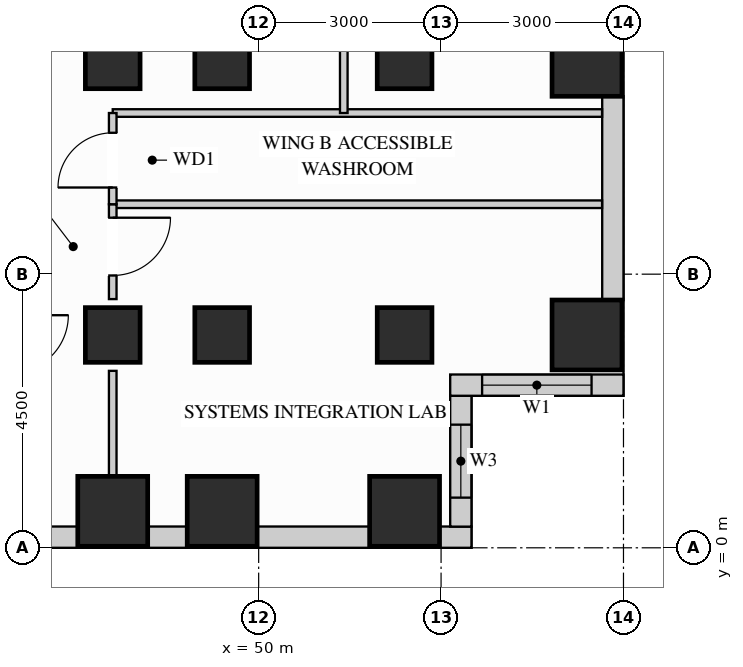
"""IFC4 building model, lengths in metres.
Left out: names, types, materials, properties, quantities, classifications, styles, units other than length and angle.
Written with IfcOpenShell. Run it as: python <this file> out.ifc"""

import sys

from ifc_helpers import new_model, si_unit, direction, frame, frame_2d, origin, origin_2d, place, context, subcontext, project, spatial, rectangle, extrude, source, transform, mapped, element, fill, save


model = new_model("IFC4")
c1 = context("Model", 3, precision=1e-05, world=origin(), true_north=direction((0.0, 1.0)))
c2 = subcontext(c1, "Body", "Model", "MODEL_VIEW")
j1 = project(units=[si_unit("LENGTHUNIT", "METRE"), si_unit("PLANEANGLEUNIT", "RADIAN")], contexts=[c1])
p1 = place(None, origin())
s1 = spatial("IfcSite", under=j1, at=p1, CompositionType="ELEMENT")
p2 = place(p1, origin())
s2 = spatial("IfcBuilding", under=s1, at=p2, CompositionType="ELEMENT")
p3 = place(p2, frame((0.0, 0.0, 77.4)))
s3 = spatial("IfcBuildingStorey", under=s2, at=p3, CompositionType="ELEMENT", Elevation=77.4)
m1 = source(origin(), c2, "Body", "SweptSolid", [
    extrude(rectangle(XDim=0.9, YDim=0.9, at=origin_2d()), origin(), (0.0, 0.0, 1.0), 3.38),
])
for number, where, z_axis, x_axis in (
    (1, (47.6, 3.5, 0.0), (0.0, 0.0, 1.0), (1.0, 0.0, 0.0)),
    (2, (47.6, 8.0, 0.0), (0.0, 0.0, 1.0), (1.0, 0.0, 0.0)),
    (3, (49.4, 3.5, 0.0), (0.0, 0.0, 1.0), (1.0, 0.0, 0.0)),
    (4, (49.4, 8.0, 0.0), (0.0, 0.0, 1.0), (1.0, 0.0, 0.0)),
    (5, (52.4, 3.5, 0.0), (0.0, 0.0, 1.0), (1.0, 0.0, 0.0)),
    (6, (52.4, 8.0, 0.0), (0.0, 0.0, 1.0), (1.0, 0.0, 0.0)),
):
    element("IfcColumn", number, at=place(p3, frame(where, z_axis=z_axis, x_axis=x_axis)), inside=s3, PredefinedType="COLUMN", context=c2, shape_type="MappedRepresentation", body=[
        mapped(m1, transform((0.0, 0.0, 0.0), x_axis=(1.0, 0.0, 0.0), y_axis=(0.0, 1.0, 0.0), z_axis=(0.0, 0.0, 1.0))),
    ])
m2 = source(origin(), c2, "Body", "SweptSolid", [
    extrude(rectangle(XDim=1.15, YDim=1.15, at=origin_2d()), origin(), (0.0, 0.0, 1.0), 3.38),
])
for number, where, z_axis, x_axis in (
    (7, (55.4, 3.5, 0.0), (0.0, 0.0, 1.0), (1.0, 0.0, 0.0)),
    (8, (55.4, 8.0, 0.0), (0.0, 0.0, 1.0), (1.0, 0.0, 0.0)),
    (9, (47.6, 0.6, 0.0), (0.0, 0.0, 1.0), (1.0, 0.0, 0.0)),
    (10, (49.4, 0.6, 0.0), (0.0, 0.0, 1.0), (1.0, 0.0, 0.0)),
    (11, (52.4, 0.6, 0.0), (0.0, 0.0, 1.0), (1.0, 0.0, 0.0)),
):
    element("IfcColumn", number, at=place(p3, frame(where, z_axis=z_axis, x_axis=x_axis)), inside=s3, PredefinedType="COLUMN", context=c2, shape_type="MappedRepresentation", body=[
        mapped(m2, transform((0.0, 0.0, 0.0), x_axis=(1.0, 0.0, 0.0), y_axis=(0.0, 1.0, 0.0), z_axis=(0.0, 0.0, 1.0))),
    ])
p4 = place(p3, frame((40.573, 0.175, 0.0), z_axis=(0.0, 0.0, 1.0), x_axis=(1.0, 0.0, 0.0)))
e12 = element("IfcWall", 12, at=p4, inside=s3, PredefinedType="SOLIDWALL", context=c2, shape_type="SweptSolid", body=[
    extrude(rectangle(XDim=6.454, YDim=0.35, at=frame_2d((3.227, 0.0))), origin(), (0.0, 0.0, 1.0), 3.365),
])
p5 = place(p4, frame((0.712, 0.0, 0.78)))
e13 = element("IfcOpeningElement", 13, at=p5, cuts=e12, PredefinedType="OPENING", context=c2, shape_type="SweptSolid", body=[
    extrude(rectangle(XDim=1.8, YDim=2.1, at=frame_2d((0.9, 1.05))), frame((0.0, 0.185, 0.0), z_axis=(0.0, -1.0, 0.0), x_axis=(1.0, 0.0, 0.0)), (0.0, 0.0, 1.0), 0.37),
])
p6 = place(p4, frame((2.905, 0.0, 0.78)))
e14 = element("IfcOpeningElement", 14, at=p6, cuts=e12, PredefinedType="OPENING", context=c2, shape_type="SweptSolid", body=[
    extrude(rectangle(XDim=1.8, YDim=2.1, at=frame_2d((0.9, 1.05))), frame((0.0, 0.185, 0.0), z_axis=(0.0, -1.0, 0.0), x_axis=(1.0, 0.0, 0.0)), (0.0, 0.0, 1.0), 0.37),
])
m3 = source(origin(), c2, "Body", "SweptSolid", [
    extrude(rectangle(XDim=0.654, YDim=0.35, at=frame_2d((0.327, 0.0))), origin(), (0.0, 0.0, 1.0), 3.365),
])
p7 = place(p3, frame((48.173, 0.175, 0.0), z_axis=(0.0, 0.0, 1.0), x_axis=(1.0, 0.0, 0.0)))
e15 = element("IfcWall", 15, at=p7, inside=s3, PredefinedType="SOLIDWALL", context=c2, shape_type="MappedRepresentation", body=[
    mapped(m3, transform((0.0, 0.0, 0.0), x_axis=(1.0, 0.0, 0.0), y_axis=(0.0, 1.0, 0.0), z_axis=(0.0, 0.0, 1.0))),
])
m4 = source(origin(), c2, "Body", "SweptSolid", [
    extrude(rectangle(XDim=1.854, YDim=0.35, at=frame_2d((0.927, 0.0))), origin(), (0.0, 0.0, 1.0), 3.365),
])
p8 = place(p3, frame((49.973, 0.175, 0.0), z_axis=(0.0, 0.0, 1.0), x_axis=(1.0, 0.0, 0.0)))
e16 = element("IfcWall", 16, at=p8, inside=s3, PredefinedType="SOLIDWALL", context=c2, shape_type="MappedRepresentation", body=[
    mapped(m4, transform((0.0, 0.0, 0.0), x_axis=(1.0, 0.0, 0.0), y_axis=(0.0, 1.0, 0.0), z_axis=(0.0, 0.0, 1.0))),
])
m5 = source(origin(), c2, "Body", "SweptSolid", [
    extrude(rectangle(XDim=0.527, YDim=0.35, at=frame_2d((0.264, 0.0))), origin(), (0.0, 0.0, 1.0), 3.365),
])
p9 = place(p3, frame((52.973, 0.175, 0.0), z_axis=(0.0, 0.0, 1.0), x_axis=(1.0, 0.0, 0.0)))
e17 = element("IfcWall", 17, at=p9, inside=s3, PredefinedType="SOLIDWALL", context=c2, shape_type="MappedRepresentation", body=[
    mapped(m5, transform((0.0, 0.0, 0.0), x_axis=(1.0, 0.0, 0.0), y_axis=(0.0, 1.0, 0.0), z_axis=(0.0, 0.0, 1.0))),
])
p10 = place(p3, frame((53.325, 0.348, 0.0), z_axis=(0.0, 0.0, 1.0), x_axis=(0.0, 1.0, 0.0)))
e18 = element("IfcWall", 18, at=p10, inside=s3, PredefinedType="SOLIDWALL", context=c2, shape_type="SweptSolid", body=[
    extrude(rectangle(XDim=2.154, YDim=0.35, at=frame_2d((1.077, 0.0))), origin(), (0.0, 0.0, 1.0), 3.365),
])
p11 = place(p10, frame((0.477, 0.0, 0.78)))
e19 = element("IfcOpeningElement", 19, at=p11, cuts=e18, PredefinedType="OPENING", context=c2, shape_type="SweptSolid", body=[
    extrude(rectangle(XDim=1.2, YDim=2.1, at=frame_2d((0.6, 1.05))), frame((0.0, 0.185, 0.0), z_axis=(0.0, -1.0, 0.0), x_axis=(1.0, 0.0, 0.0)), (0.0, 0.0, 1.0), 0.37),
])
p12 = place(p3, frame((53.15, 2.675, 0.0), z_axis=(0.0, 0.0, 1.0), x_axis=(1.0, 0.0, 0.0)))
e20 = element("IfcWall", 20, at=p12, inside=s3, PredefinedType="SOLIDWALL", context=c2, shape_type="SweptSolid", body=[
    extrude(rectangle(XDim=2.85, YDim=0.35, at=frame_2d((1.425, 0.0))), origin(), (0.0, 0.0, 1.0), 3.365),
])
p13 = place(p12, frame((0.525, 0.0, 0.78)))
e21 = element("IfcOpeningElement", 21, at=p13, cuts=e20, PredefinedType="OPENING", context=c2, shape_type="SweptSolid", body=[
    extrude(rectangle(XDim=1.8, YDim=2.1, at=frame_2d((0.9, 1.05))), frame((0.0, 0.185, 0.0), z_axis=(0.0, -1.0, 0.0), x_axis=(1.0, 0.0, 0.0)), (0.0, 0.0, 1.0), 0.37),
])
m6 = source(origin(), c2, "Body", "SweptSolid", [
    extrude(rectangle(XDim=3.354, YDim=0.35, at=frame_2d((1.677, 0.0))), origin(), (0.0, 0.0, 1.0), 3.365),
])
p14 = place(p3, frame((55.825, 4.073, 0.0), z_axis=(0.0, 0.0, 1.0), x_axis=(0.0, 1.0, 0.0)))
e22 = element("IfcWall", 22, at=p14, inside=s3, PredefinedType="SOLIDWALL", context=c2, shape_type="MappedRepresentation", body=[
    mapped(m6, transform((0.0, 0.0, 0.0), x_axis=(1.0, 0.0, 0.0), y_axis=(0.0, 1.0, 0.0), z_axis=(0.0, 0.0, 1.0))),
])
m7 = source(origin(), c2, "Body", "SweptSolid", [
    extrude(rectangle(XDim=8.048, YDim=0.125, at=frame_2d((4.024, 0.0))), origin(), (0.0, 0.0, 1.0), 3.365),
])
for number, where, z_axis, x_axis in (
    (23, (47.6, 5.65, 0.0), (0.0, 0.0, 1.0), (1.0, 0.0, 0.0)),
    (24, (47.6, 7.15, 0.0), (0.0, 0.0, 1.0), (1.0, 0.0, 0.0)),
):
    element("IfcWall", number, at=place(p3, frame(where, z_axis=z_axis, x_axis=x_axis)), inside=s3, PredefinedType="PARTITIONING", context=c2, shape_type="MappedRepresentation", body=[
        mapped(m7, transform((0.0, 0.0, 0.0), x_axis=(1.0, 0.0, 0.0), y_axis=(0.0, 1.0, 0.0), z_axis=(0.0, 0.0, 1.0))),
    ])
m8 = source(origin(), c2, "Body", "SweptSolid", [
    extrude(rectangle(XDim=3.45, YDim=0.125, at=frame_2d((1.725, 0.0))), origin(), (0.0, 0.0, 1.0), 3.365),
])
p15 = place(p3, frame((51.4, 7.15, 0.0), z_axis=(0.0, 0.0, 1.0), x_axis=(0.0, 1.0, 0.0)))
e25 = element("IfcWall", 25, at=p15, inside=s3, PredefinedType="PARTITIONING", context=c2, shape_type="MappedRepresentation", body=[
    mapped(m8, transform((0.0, 0.0, 0.0), x_axis=(1.0, 0.0, 0.0), y_axis=(0.0, 1.0, 0.0), z_axis=(0.0, 0.0, 1.0))),
])
p16 = place(p3, frame((47.6, 4.09, 0.0), z_axis=(0.0, 0.0, 1.0), x_axis=(0.0, 1.0, 0.0)))
e26 = element("IfcWall", 26, at=p16, inside=s3, PredefinedType="PARTITIONING", context=c2, shape_type="SweptSolid", body=[
    extrude(rectangle(XDim=1.56, YDim=0.125, at=frame_2d((0.78, 0.0))), origin(), (0.0, 0.0, 1.0), 2.677),
])
p17 = place(p16, frame((0.388, 0.0, 0.0)))
e27 = element("IfcOpeningElement", 27, at=p17, cuts=e26, PredefinedType="OPENING", context=c2, shape_type="SweptSolid", body=[
    extrude(rectangle(XDim=0.95, YDim=2.15, at=frame_2d((0.475, 1.075))), frame((0.0, 0.073, 0.0), z_axis=(0.0, -1.0, 0.0), x_axis=(1.0, 0.0, 0.0)), (0.0, 0.0, 1.0), 0.145),
])
m9 = source(origin(), c2, "Body", "SweptSolid", [
    extrude(rectangle(XDim=1.72, YDim=0.125, at=frame_2d((0.86, 0.0))), origin(), (0.0, 0.0, 1.0), 2.677),
])
p18 = place(p3, frame((47.6, 1.19, 0.0), z_axis=(0.0, 0.0, 1.0), x_axis=(0.0, 1.0, 0.0)))
e28 = element("IfcWall", 28, at=p18, inside=s3, PredefinedType="PARTITIONING", context=c2, shape_type="MappedRepresentation", body=[
    mapped(m9, transform((0.0, 0.0, 0.0), x_axis=(1.0, 0.0, 0.0), y_axis=(0.0, 1.0, 0.0), z_axis=(0.0, 0.0, 1.0))),
])
p19 = place(p3, frame((47.6, 5.65, 0.0), z_axis=(0.0, 0.0, 1.0), x_axis=(0.0, 1.0, 0.0)))
e29 = element("IfcWall", 29, at=p19, inside=s3, PredefinedType="PARTITIONING", context=c2, shape_type="SweptSolid", body=[
    extrude(rectangle(XDim=1.5, YDim=0.125, at=frame_2d((0.75, 0.0))), origin(), (0.0, 0.0, 1.0), 2.677),
])
p20 = place(p19, frame((0.275, 0.0, 0.0)))
e30 = element("IfcOpeningElement", 30, at=p20, cuts=e29, PredefinedType="OPENING", context=c2, shape_type="SweptSolid", body=[
    extrude(rectangle(XDim=0.9, YDim=2.15, at=frame_2d((0.45, 1.075))), frame((0.0, 0.073, 0.0), z_axis=(0.0, -1.0, 0.0), x_axis=(1.0, 0.0, 0.0)), (0.0, 0.0, 1.0), 0.145),
])
m10 = source(origin(), c2, "Body", "SweptSolid", [
    extrude(rectangle(XDim=0.95, YDim=2.15, at=frame_2d((0.475, 1.075))), frame((0.0, 0.025, 0.0), z_axis=(0.0, -1.0, 0.0), x_axis=(1.0, 0.0, 0.0)), (0.0, 0.0, 1.0), 0.05),
])
p21 = place(p17, origin())
e31 = element("IfcDoor", 31, at=p21, inside=s3, OperationType="SINGLE_SWING_RIGHT", PredefinedType="DOOR", context=c2, shape_type="MappedRepresentation", body=[
    mapped(m10, transform((0.0, 0.0, 0.0), x_axis=(1.0, 0.0, 0.0), y_axis=(0.0, 1.0, 0.0), z_axis=(0.0, 0.0, 1.0))),
])
fill(e27, e31)
m11 = source(origin(), c2, "Body", "SweptSolid", [
    extrude(rectangle(XDim=0.9, YDim=2.15, at=frame_2d((0.45, 1.075))), frame((0.0, 0.025, 0.0), z_axis=(0.0, -1.0, 0.0), x_axis=(1.0, 0.0, 0.0)), (0.0, 0.0, 1.0), 0.05),
])
p22 = place(p20, origin())
e32 = element("IfcDoor", 32, at=p22, inside=s3, OperationType="SINGLE_SWING_LEFT", PredefinedType="DOOR", context=c2, shape_type="MappedRepresentation", body=[
    mapped(m11, transform((0.0, 0.0, 0.0), x_axis=(1.0, 0.0, 0.0), y_axis=(0.0, 1.0, 0.0), z_axis=(0.0, 0.0, 1.0))),
])
fill(e30, e32)
m12 = source(origin(), c2, "Body", "SweptSolid", [
    extrude(rectangle(XDim=1.8, YDim=2.1, at=frame_2d((0.9, 1.05))), frame((0.0, 0.03, 0.0), z_axis=(0.0, -1.0, 0.0), x_axis=(1.0, 0.0, 0.0)), (0.0, 0.0, 1.0), 0.06),
])
p23 = place(p13, origin())
e33 = element("IfcWindow", 33, at=p23, inside=s3, PartitioningType="SINGLE_PANEL", PredefinedType="WINDOW", context=c2, shape_type="MappedRepresentation", body=[
    mapped(m12, transform((0.0, 0.0, 0.0), x_axis=(1.0, 0.0, 0.0), y_axis=(0.0, 1.0, 0.0), z_axis=(0.0, 0.0, 1.0))),
])
fill(e21, e33)
m13 = source(origin(), c2, "Body", "SweptSolid", [
    extrude(rectangle(XDim=1.2, YDim=2.1, at=frame_2d((0.6, 1.05))), frame((0.0, 0.03, 0.0), z_axis=(0.0, -1.0, 0.0), x_axis=(1.0, 0.0, 0.0)), (0.0, 0.0, 1.0), 0.06),
])
p24 = place(p11, origin())
e34 = element("IfcWindow", 34, at=p24, inside=s3, PartitioningType="SINGLE_PANEL", PredefinedType="WINDOW", context=c2, shape_type="MappedRepresentation", body=[
    mapped(m13, transform((0.0, 0.0, 0.0), x_axis=(1.0, 0.0, 0.0), y_axis=(0.0, 1.0, 0.0), z_axis=(0.0, 0.0, 1.0))),
])
fill(e19, e34)
save(model, sys.argv[1])
